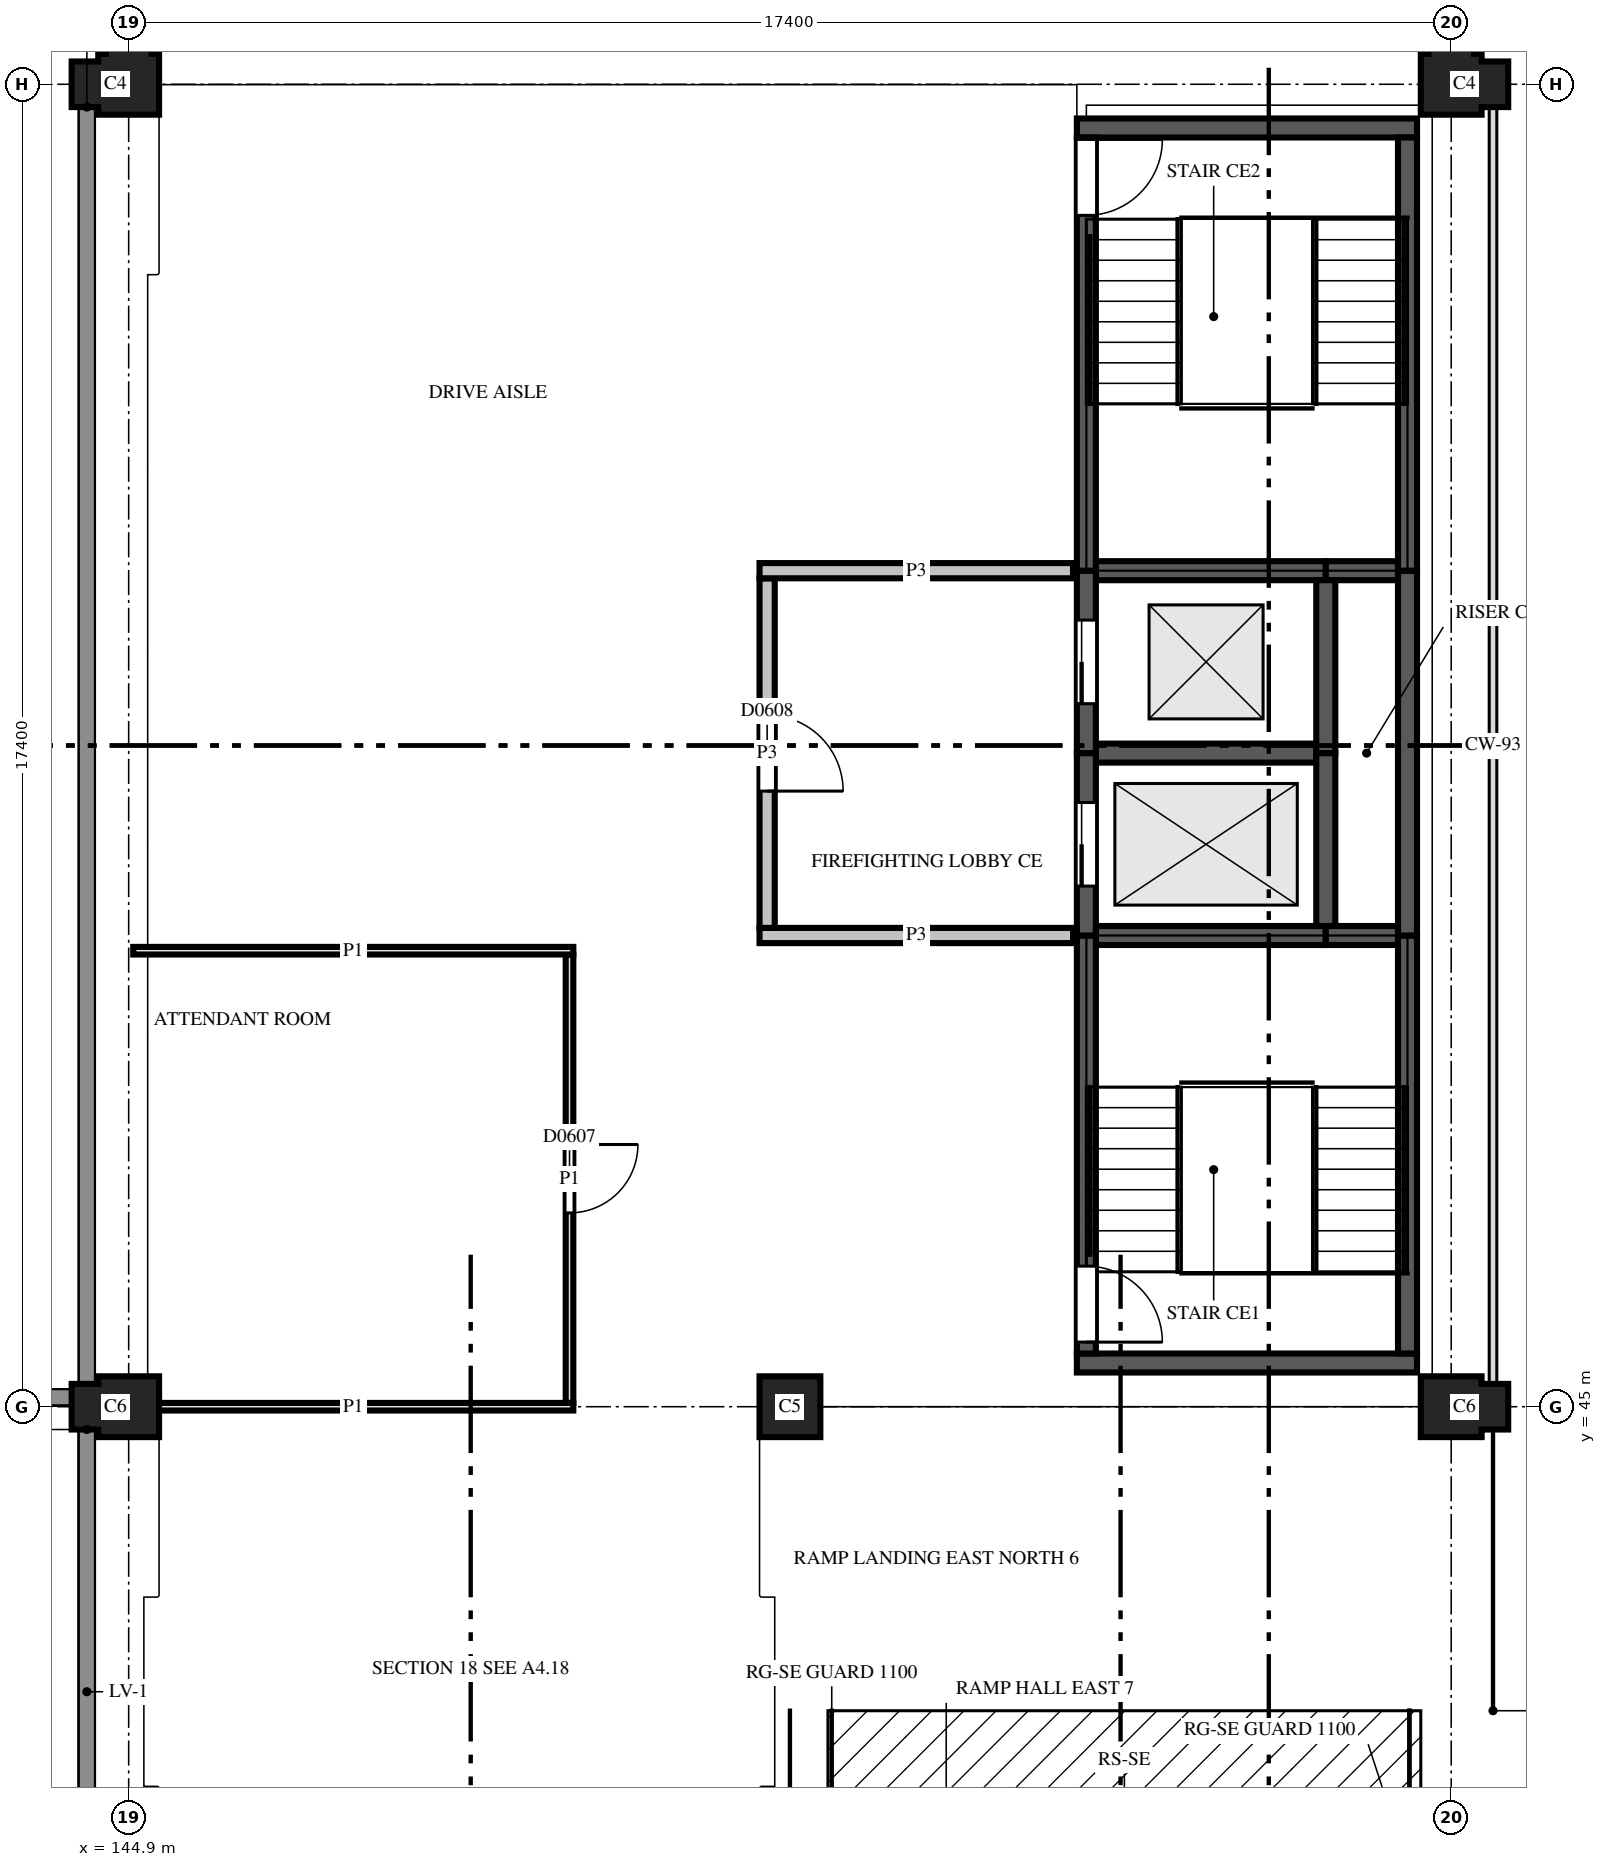
"""IFC4 building model, lengths in metres.
Left out: names, types, materials, properties, quantities, classifications, styles, units other than length and angle.
Written with IfcOpenShell. Run it as: python <this file> out.ifc"""

import sys

from ifc_helpers import new_model, si_unit, direction, frame, frame_2d, origin, place, context, subcontext, project, spatial, polyline, rectangle, outline, extrude, element, fill, save


model = new_model("IFC4")
c1 = context("Model", 3, precision=1e-05, world=origin(), true_north=direction((0.0, 1.0)))
c2 = subcontext(c1, "Body", "Model", "MODEL_VIEW")
j1 = project(units=[si_unit("LENGTHUNIT", "METRE"), si_unit("PLANEANGLEUNIT", "RADIAN")], contexts=[c1])
p1 = place(None, origin())
s1 = spatial("IfcSite", under=j1, at=p1, CompositionType="ELEMENT")
p2 = place(p1, origin())
s2 = spatial("IfcBuilding", under=s1, at=p2, CompositionType="ELEMENT")
p3 = place(p2, frame((0.0, 0.0, 23.0)))
s3 = spatial("IfcBuildingStorey", under=s2, at=p3, CompositionType="ELEMENT", Elevation=23.0)
p4 = place(p3, frame((144.9, 45.0, 0.0), z_axis=(0.0, 0.0, 1.0), x_axis=(-1.0, 0.0, 0.0)))
e1 = element("IfcColumn", 1, at=p4, inside=s3, PredefinedType="COLUMN", context=c2, shape_type="SweptSolid", body=[
    extrude(outline(polyline([(-0.4, -0.4), (0.4, -0.4), (0.4, -0.3), (0.75, -0.3), (0.75, 0.3), (0.4, 0.3), (0.4, 0.4), (-0.4, 0.4), (-0.4, -0.4)])), origin(), (0.0, 0.0, 1.0), 3.7),
])
p5 = place(p3, frame((153.6, 45.0, 0.0), z_axis=(0.0, 0.0, 1.0), x_axis=(1.0, 0.0, 0.0)))
e2 = element("IfcColumn", 2, at=p5, inside=s3, PredefinedType="COLUMN", context=c2, shape_type="SweptSolid", body=[
    extrude(outline(polyline([(-0.4, -0.4), (0.4, -0.4), (0.4, 0.4), (-0.4, 0.4), (-0.4, -0.4)])), origin(), (0.0, 0.0, 1.0), 3.7),
])
p6 = place(p3, frame((162.3, 45.0, 0.0), z_axis=(0.0, 0.0, 1.0), x_axis=(1.0, 0.0, 0.0)))
e3 = element("IfcColumn", 3, at=p6, inside=s3, PredefinedType="COLUMN", context=c2, shape_type="SweptSolid", body=[
    extrude(outline(polyline([(-0.4, -0.4), (0.4, -0.4), (0.4, -0.3), (0.75, -0.3), (0.75, 0.3), (0.4, 0.3), (0.4, 0.4), (-0.4, 0.4), (-0.4, -0.4)])), origin(), (0.0, 0.0, 1.0), 3.7),
])
for number, where, z_axis, x_axis in (
    (4, (144.9, 62.4, 0.0), (0.0, 0.0, 1.0), (0.0, 1.0, 0.0)),
    (5, (162.3, 62.4, 0.0), (0.0, 0.0, 1.0), (1.0, 0.0, 0.0)),
):
    element("IfcColumn", number, at=place(p3, frame(where, z_axis=z_axis, x_axis=x_axis)), inside=s3, PredefinedType="COLUMN", context=c2, shape_type="SweptSolid", body=[
        extrude(outline(polyline([(-0.4, -0.4), (0.4, -0.4), (0.4, -0.3), (0.75, -0.3), (0.75, 0.3), (0.4, 0.3), (0.4, 0.4), (0.3, 0.4), (0.3, 0.75), (-0.3, 0.75), (-0.3, 0.4), (-0.4, 0.4), (-0.4, -0.4)])), origin(), (0.0, 0.0, 1.0), 3.7),
    ])
p7 = place(p3, frame((157.375, 45.575, 0.0), z_axis=(0.0, 0.0, 1.0), x_axis=(1.0, 0.0, 0.0)))
e6 = element("IfcWall", 6, at=p7, inside=s3, PredefinedType="SHEAR", context=c2, shape_type="SweptSolid", body=[
    extrude(rectangle(XDim=4.475, YDim=0.25, at=frame_2d((2.238, 0.0))), origin(), (0.0, 0.0, 1.0), 3.7),
])
p8 = place(p3, frame((157.625, 51.2, 0.0), z_axis=(0.0, 0.0, 1.0), x_axis=(1.0, 0.0, 0.0)))
e7 = element("IfcWall", 7, at=p8, inside=s3, PredefinedType="SHEAR", context=c2, shape_type="SweptSolid", body=[
    extrude(rectangle(XDim=3.025, YDim=0.25, at=frame_2d((1.512, 0.0))), origin(), (0.0, 0.0, 1.0), 3.7),
])
p9 = place(p3, frame((160.65, 51.2, 0.0), z_axis=(0.0, 0.0, 1.0), x_axis=(1.0, 0.0, 0.0)))
e8 = element("IfcWall", 8, at=p9, inside=s3, PredefinedType="SHEAR", context=c2, shape_type="SweptSolid", body=[
    extrude(rectangle(XDim=0.95, YDim=0.25, at=frame_2d((0.475, 0.0))), origin(), (0.0, 0.0, 1.0), 3.7),
])
p10 = place(p3, frame((157.625, 53.6, 0.0), z_axis=(0.0, 0.0, 1.0), x_axis=(1.0, 0.0, 0.0)))
e9 = element("IfcWall", 9, at=p10, inside=s3, PredefinedType="SHEAR", context=c2, shape_type="SweptSolid", body=[
    extrude(rectangle(XDim=2.9, YDim=0.25, at=frame_2d((1.45, 0.0))), origin(), (0.0, 0.0, 1.0), 3.7),
])
p11 = place(p3, frame((157.625, 56.0, 0.0), z_axis=(0.0, 0.0, 1.0), x_axis=(1.0, 0.0, 0.0)))
e10 = element("IfcWall", 10, at=p11, inside=s3, PredefinedType="SHEAR", context=c2, shape_type="SweptSolid", body=[
    extrude(rectangle(XDim=3.025, YDim=0.25, at=frame_2d((1.512, 0.0))), origin(), (0.0, 0.0, 1.0), 3.7),
])
p12 = place(p3, frame((160.65, 56.0, 0.0), z_axis=(0.0, 0.0, 1.0), x_axis=(1.0, 0.0, 0.0)))
e11 = element("IfcWall", 11, at=p12, inside=s3, PredefinedType="SHEAR", context=c2, shape_type="SweptSolid", body=[
    extrude(rectangle(XDim=0.95, YDim=0.25, at=frame_2d((0.475, 0.0))), origin(), (0.0, 0.0, 1.0), 3.7),
])
p13 = place(p3, frame((157.375, 61.825, 0.0), z_axis=(0.0, 0.0, 1.0), x_axis=(1.0, 0.0, 0.0)))
e12 = element("IfcWall", 12, at=p13, inside=s3, PredefinedType="SHEAR", context=c2, shape_type="SweptSolid", body=[
    extrude(rectangle(XDim=4.475, YDim=0.25, at=frame_2d((2.238, 0.0))), origin(), (0.0, 0.0, 1.0), 3.7),
])
p14 = place(p3, frame((157.5, 45.7, 0.0), z_axis=(0.0, 0.0, 1.0), x_axis=(0.0, 1.0, 0.0)))
e13 = element("IfcWall", 13, at=p14, inside=s3, PredefinedType="SHEAR", context=c2, shape_type="SweptSolid", body=[
    extrude(rectangle(XDim=5.5, YDim=0.25, at=frame_2d((2.75, 0.0))), origin(), (0.0, 0.0, 1.0), 3.7),
])
p15 = place(p14, frame((0.15, 0.0, 0.0)))
e14 = element("IfcOpeningElement", 14, at=p15, cuts=e13, PredefinedType="OPENING", context=c2, shape_type="SweptSolid", body=[
    extrude(rectangle(XDim=1.0, YDim=2.1, at=frame_2d((0.5, 1.05))), frame((0.0, 0.135, 0.0), z_axis=(0.0, -1.0, 0.0), x_axis=(1.0, 0.0, 0.0)), (0.0, 0.0, 1.0), 0.27),
])
p16 = place(p3, frame((157.5, 51.2, 0.0), z_axis=(0.0, 0.0, 1.0), x_axis=(0.0, 1.0, 0.0)))
e15 = element("IfcWall", 15, at=p16, inside=s3, PredefinedType="SHEAR", context=c2, shape_type="SweptSolid", body=[
    extrude(rectangle(XDim=2.4, YDim=0.25, at=frame_2d((1.2, 0.0))), origin(), (0.0, 0.0, 1.0), 3.7),
])
p17 = place(p16, frame((0.65, 0.0, 0.0)))
e16 = element("IfcOpeningElement", 16, at=p17, cuts=e15, PredefinedType="OPENING", context=c2, shape_type="SweptSolid", body=[
    extrude(rectangle(XDim=1.1, YDim=2.1, at=frame_2d((0.55, 1.05))), frame((0.0, 0.135, 0.0), z_axis=(0.0, -1.0, 0.0), x_axis=(1.0, 0.0, 0.0)), (0.0, 0.0, 1.0), 0.27),
])
p18 = place(p3, frame((157.5, 53.6, 0.0), z_axis=(0.0, 0.0, 1.0), x_axis=(0.0, 1.0, 0.0)))
e17 = element("IfcWall", 17, at=p18, inside=s3, PredefinedType="SHEAR", context=c2, shape_type="SweptSolid", body=[
    extrude(rectangle(XDim=2.4, YDim=0.25, at=frame_2d((1.2, 0.0))), origin(), (0.0, 0.0, 1.0), 3.7),
])
p19 = place(p18, frame((0.65, 0.0, 0.0)))
e18 = element("IfcOpeningElement", 18, at=p19, cuts=e17, PredefinedType="OPENING", context=c2, shape_type="SweptSolid", body=[
    extrude(rectangle(XDim=1.1, YDim=2.1, at=frame_2d((0.55, 1.05))), frame((0.0, 0.135, 0.0), z_axis=(0.0, -1.0, 0.0), x_axis=(1.0, 0.0, 0.0)), (0.0, 0.0, 1.0), 0.27),
])
p20 = place(p3, frame((157.5, 56.0, 0.0), z_axis=(0.0, 0.0, 1.0), x_axis=(0.0, 1.0, 0.0)))
e19 = element("IfcWall", 19, at=p20, inside=s3, PredefinedType="SHEAR", context=c2, shape_type="SweptSolid", body=[
    extrude(rectangle(XDim=5.7, YDim=0.25, at=frame_2d((2.85, 0.0))), origin(), (0.0, 0.0, 1.0), 3.7),
])
p21 = place(p20, frame((4.675, 0.0, 0.0)))
e20 = element("IfcOpeningElement", 20, at=p21, cuts=e19, PredefinedType="OPENING", context=c2, shape_type="SweptSolid", body=[
    extrude(rectangle(XDim=1.0, YDim=2.1, at=frame_2d((0.5, 1.05))), frame((0.0, 0.135, 0.0), z_axis=(0.0, -1.0, 0.0), x_axis=(1.0, 0.0, 0.0)), (0.0, 0.0, 1.0), 0.27),
])
p22 = place(p3, frame((160.65, 51.325, 0.0), z_axis=(0.0, 0.0, 1.0), x_axis=(0.0, 1.0, 0.0)))
e21 = element("IfcWall", 21, at=p22, inside=s3, PredefinedType="SHEAR", context=c2, shape_type="SweptSolid", body=[
    extrude(rectangle(XDim=2.275, YDim=0.25, at=frame_2d((1.138, 0.0))), origin(), (0.0, 0.0, 1.0), 3.7),
])
p23 = place(p3, frame((160.65, 53.6, 0.0), z_axis=(0.0, 0.0, 1.0), x_axis=(0.0, 1.0, 0.0)))
e22 = element("IfcWall", 22, at=p23, inside=s3, PredefinedType="SHEAR", context=c2, shape_type="SweptSolid", body=[
    extrude(rectangle(XDim=2.275, YDim=0.25, at=frame_2d((1.137, 0.0))), origin(), (0.0, 0.0, 1.0), 3.7),
])
p24 = place(p3, frame((161.725, 45.7, 0.0), z_axis=(0.0, 0.0, 1.0), x_axis=(0.0, 1.0, 0.0)))
e23 = element("IfcWall", 23, at=p24, inside=s3, PredefinedType="SHEAR", context=c2, shape_type="SweptSolid", body=[
    extrude(rectangle(XDim=5.5, YDim=0.25, at=frame_2d((2.75, 0.0))), origin(), (0.0, 0.0, 1.0), 3.7),
])
p25 = place(p3, frame((161.725, 51.2, 0.0), z_axis=(0.0, 0.0, 1.0), x_axis=(0.0, 1.0, 0.0)))
e24 = element("IfcWall", 24, at=p25, inside=s3, PredefinedType="SHEAR", context=c2, shape_type="SweptSolid", body=[
    extrude(rectangle(XDim=4.8, YDim=0.25, at=frame_2d((2.4, 0.0))), origin(), (0.0, 0.0, 1.0), 3.7),
])
p26 = place(p3, frame((161.725, 56.0, 0.0), z_axis=(0.0, 0.0, 1.0), x_axis=(0.0, 1.0, 0.0)))
e25 = element("IfcWall", 25, at=p26, inside=s3, PredefinedType="SHEAR", context=c2, shape_type="SweptSolid", body=[
    extrude(rectangle(XDim=5.7, YDim=0.25, at=frame_2d((2.85, 0.0))), origin(), (0.0, 0.0, 1.0), 3.7),
])
p27 = place(p3, frame((144.96, 45.0, 0.0), z_axis=(0.0, 0.0, 1.0), x_axis=(1.0, 0.0, 0.0)))
e26 = element("IfcWall", 26, at=p27, inside=s3, PredefinedType="PARTITIONING", context=c2, shape_type="SweptSolid", body=[
    extrude(rectangle(XDim=5.79, YDim=0.1, at=frame_2d((2.895, 0.0))), origin(), (0.0, 0.0, 1.0), 2.88),
])
p28 = place(p3, frame((150.7, 45.05, 0.0), z_axis=(0.0, 0.0, 1.0), x_axis=(0.0, 1.0, 0.0)))
e27 = element("IfcWall", 27, at=p28, inside=s3, PredefinedType="PARTITIONING", context=c2, shape_type="SweptSolid", body=[
    extrude(rectangle(XDim=5.9, YDim=0.1, at=frame_2d((2.95, 0.0))), origin(), (0.0, 0.0, 1.0), 2.88),
])
p29 = place(p28, frame((2.5, 0.0, 0.0)))
e28 = element("IfcOpeningElement", 28, at=p29, cuts=e27, PredefinedType="OPENING", context=c2, shape_type="SweptSolid", body=[
    extrude(rectangle(XDim=0.9, YDim=2.1, at=frame_2d((0.45, 1.05))), frame((0.0, 0.06, 0.0), z_axis=(0.0, -1.0, 0.0), x_axis=(1.0, 0.0, 0.0)), (0.0, 0.0, 1.0), 0.12),
])
p30 = place(p3, frame((150.75, 51.0, 0.0), z_axis=(0.0, 0.0, 1.0), x_axis=(-1.0, 0.0, 0.0)))
e29 = element("IfcWall", 29, at=p30, inside=s3, PredefinedType="PARTITIONING", context=c2, shape_type="SweptSolid", body=[
    extrude(rectangle(XDim=5.79, YDim=0.1, at=frame_2d((2.895, 0.0))), origin(), (0.0, 0.0, 1.0), 2.88),
])
p31 = place(p3, frame((153.2, 51.2, 0.0), z_axis=(0.0, 0.0, 1.0), x_axis=(1.0, 0.0, 0.0)))
e30 = element("IfcWall", 30, at=p31, inside=s3, PredefinedType="PARTITIONING", context=c2, shape_type="SweptSolid", body=[
    extrude(rectangle(XDim=4.125, YDim=0.2, at=frame_2d((2.062, 0.0))), origin(), (0.0, 0.0, 1.0), 2.88),
])
p32 = place(p3, frame((153.3, 55.9, 0.0), z_axis=(0.0, 0.0, 1.0), x_axis=(0.0, -1.0, 0.0)))
e31 = element("IfcWall", 31, at=p32, inside=s3, PredefinedType="PARTITIONING", context=c2, shape_type="SweptSolid", body=[
    extrude(rectangle(XDim=4.6, YDim=0.2, at=frame_2d((2.3, 0.0))), origin(), (0.0, 0.0, 1.0), 2.88),
])
p33 = place(p32, frame((1.8, 0.0, 0.0)))
e32 = element("IfcOpeningElement", 32, at=p33, cuts=e31, PredefinedType="OPENING", context=c2, shape_type="SweptSolid", body=[
    extrude(rectangle(XDim=1.0, YDim=2.1, at=frame_2d((0.5, 1.05))), frame((0.0, 0.11, 0.0), z_axis=(0.0, -1.0, 0.0), x_axis=(1.0, 0.0, 0.0)), (0.0, 0.0, 1.0), 0.22),
])
p34 = place(p3, frame((157.325, 56.0, 0.0), z_axis=(0.0, 0.0, 1.0), x_axis=(-1.0, 0.0, 0.0)))
e33 = element("IfcWall", 33, at=p34, inside=s3, PredefinedType="PARTITIONING", context=c2, shape_type="SweptSolid", body=[
    extrude(rectangle(XDim=4.125, YDim=0.2, at=frame_2d((2.062, 0.0))), origin(), (0.0, 0.0, 1.0), 2.88),
])
p35 = place(p29, origin())
e34 = element("IfcDoor", 34, at=p35, inside=s3, OperationType="SINGLE_SWING_RIGHT", PredefinedType="DOOR", context=c2, shape_type="SweptSolid", body=[
    extrude(rectangle(XDim=0.9, YDim=2.1, at=frame_2d((0.45, 1.05))), frame((0.0, 0.025, 0.0), z_axis=(0.0, -1.0, 0.0), x_axis=(1.0, 0.0, 0.0)), (0.0, 0.0, 1.0), 0.05),
])
fill(e28, e34)
p36 = place(p33, origin())
e35 = element("IfcDoor", 35, at=p36, inside=s3, OperationType="SINGLE_SWING_LEFT", PredefinedType="DOOR", context=c2, shape_type="SweptSolid", body=[
    extrude(rectangle(XDim=1.0, YDim=2.1, at=frame_2d((0.5, 1.05))), frame((0.0, 0.025, 0.0), z_axis=(0.0, -1.0, 0.0), x_axis=(1.0, 0.0, 0.0)), (0.0, 0.0, 1.0), 0.05),
])
fill(e32, e35)
p37 = place(p17, origin())
e36 = element("IfcDoor", 36, at=p37, inside=s3, OperationType="SLIDING_TO_LEFT", PredefinedType="DOOR", context=c2, shape_type="SweptSolid", body=[
    extrude(rectangle(XDim=1.1, YDim=2.1, at=frame_2d((0.55, 1.05))), frame((0.0, 0.025, 0.0), z_axis=(0.0, -1.0, 0.0), x_axis=(1.0, 0.0, 0.0)), (0.0, 0.0, 1.0), 0.05),
])
fill(e16, e36)
p38 = place(p19, origin())
e37 = element("IfcDoor", 37, at=p38, inside=s3, OperationType="SLIDING_TO_LEFT", PredefinedType="DOOR", context=c2, shape_type="SweptSolid", body=[
    extrude(rectangle(XDim=1.1, YDim=2.1, at=frame_2d((0.55, 1.05))), frame((0.0, 0.025, 0.0), z_axis=(0.0, -1.0, 0.0), x_axis=(1.0, 0.0, 0.0)), (0.0, 0.0, 1.0), 0.05),
])
fill(e18, e37)
p39 = place(p21, origin())
e38 = element("IfcDoor", 38, at=p39, inside=s3, OperationType="SINGLE_SWING_RIGHT", PredefinedType="DOOR", context=c2, shape_type="SweptSolid", body=[
    extrude(rectangle(XDim=1.0, YDim=2.1, at=frame_2d((0.5, 1.05))), frame((0.0, 0.025, 0.0), z_axis=(0.0, -1.0, 0.0), x_axis=(1.0, 0.0, 0.0)), (0.0, 0.0, 1.0), 0.05),
])
fill(e20, e38)
p40 = place(p15, origin())
e39 = element("IfcDoor", 39, at=p40, inside=s3, OperationType="SINGLE_SWING_LEFT", PredefinedType="DOOR", context=c2, shape_type="SweptSolid", body=[
    extrude(rectangle(XDim=1.0, YDim=2.1, at=frame_2d((0.5, 1.05))), frame((0.0, 0.025, 0.0), z_axis=(0.0, -1.0, 0.0), x_axis=(1.0, 0.0, 0.0)), (0.0, 0.0, 1.0), 0.05),
])
fill(e14, e39)
save(model, sys.argv[1])
